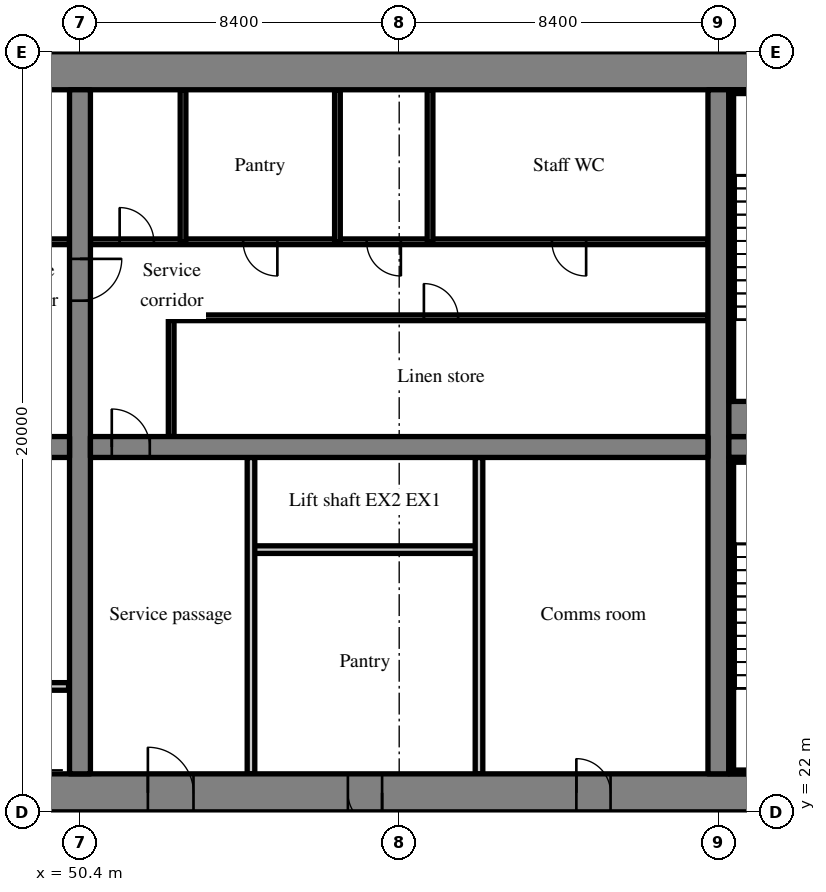
"""IFC4 building model, lengths in metres.
Left out: names, types, materials, properties, quantities, classifications, styles, units other than length and angle.
Written with IfcOpenShell. Run it as: python <this file> out.ifc"""

import sys

from ifc_helpers import new_model, si_unit, direction, frame, frame_2d, origin, place, context, subcontext, project, spatial, rectangle, extrude, source, transform, mapped, element, fill, save


model = new_model("IFC4")
c1 = context("Model", 3, precision=1e-05, world=origin(), true_north=direction((0.0, 1.0)))
c2 = subcontext(c1, "Body", "Model", "MODEL_VIEW")
j1 = project(units=[si_unit("LENGTHUNIT", "METRE"), si_unit("PLANEANGLEUNIT", "RADIAN")], contexts=[c1])
p1 = place(None, origin())
s1 = spatial("IfcSite", under=j1, at=p1, CompositionType="ELEMENT")
p2 = place(p1, origin())
s2 = spatial("IfcBuilding", under=s1, at=p2, CompositionType="ELEMENT")
p3 = place(p2, frame((0.0, 0.0, 77.2)))
s3 = spatial("IfcBuildingStorey", under=s2, at=p3, CompositionType="ELEMENT", Elevation=77.2)
m1 = source(origin(), c2, "Body", "SweptSolid", [
    extrude(rectangle(XDim=50.4, YDim=1.0, at=frame_2d((25.2, 0.0))), origin(), (0.0, 0.0, 1.0), 3.52),
])
p4 = place(p3, frame((25.2, 22.5, 0.0), z_axis=(0.0, 0.0, 1.0), x_axis=(1.0, 0.0, 0.0)))
e1 = element("IfcWall", 1, at=p4, inside=s3, PredefinedType="SHEAR", context=c2, shape_type="MappedRepresentation", body=[
    mapped(m1, transform((0.0, 0.0, 0.0), scale=1.0)),
])
m2 = source(origin(), c2, "Body", "SweptSolid", [
    extrude(rectangle(XDim=1.8, YDim=2.1, at=frame_2d((0.9, 1.05))), frame((0.0, 0.51, 0.0), z_axis=(0.0, -1.0, 0.0), x_axis=(1.0, 0.0, 0.0)), (0.0, 0.0, 1.0), 1.02),
])
p5 = place(p4, frame((15.9, 0.0, 0.0)))
e2 = element("IfcOpeningElement", 2, at=p5, cuts=e1, PredefinedType="OPENING", context=c2, shape_type="MappedRepresentation", body=[
    mapped(m2, transform((0.0, 0.0, 0.0), scale=1.0)),
])
m3 = source(origin(), c2, "Body", "SweptSolid", [
    extrude(rectangle(XDim=1.2, YDim=2.1, at=frame_2d((0.6, 1.05))), frame((0.0, 0.51, 0.0), z_axis=(0.0, -1.0, 0.0), x_axis=(1.0, 0.0, 0.0)), (0.0, 0.0, 1.0), 1.02),
])
p6 = place(p4, frame((26.987, 0.0, 0.0)))
e3 = element("IfcOpeningElement", 3, at=p6, cuts=e1, PredefinedType="OPENING", context=c2, shape_type="MappedRepresentation", body=[
    mapped(m3, transform((0.0, 0.0, 0.0), scale=1.0)),
])
m4 = source(origin(), c2, "Body", "SweptSolid", [
    extrude(rectangle(XDim=0.9, YDim=2.1, at=frame_2d((0.45, 1.05))), frame((0.0, 0.51, 0.0), z_axis=(0.0, -1.0, 0.0), x_axis=(1.0, 0.0, 0.0)), (0.0, 0.0, 1.0), 1.02),
])
p7 = place(p4, frame((32.25, 0.0, 0.0)))
e4 = element("IfcOpeningElement", 4, at=p7, cuts=e1, PredefinedType="OPENING", context=c2, shape_type="MappedRepresentation", body=[
    mapped(m4, transform((0.0, 0.0, 0.0), scale=1.0)),
])
p8 = place(p4, frame((38.262, 0.0, 0.0)))
e5 = element("IfcOpeningElement", 5, at=p8, cuts=e1, PredefinedType="OPENING", context=c2, shape_type="MappedRepresentation", body=[
    mapped(m4, transform((0.0, 0.0, 0.0), scale=1.0)),
])
p9 = place(p4, frame((6.438, 0.0, 0.0)))
e6 = element("IfcOpeningElement", 6, at=p9, cuts=e1, PredefinedType="OPENING", context=c2, shape_type="MappedRepresentation", body=[
    mapped(m3, transform((0.0, 0.0, 0.0), scale=1.0)),
])
p10 = place(p4, frame((47.725, 0.0, 0.0)))
e7 = element("IfcOpeningElement", 7, at=p10, cuts=e1, PredefinedType="OPENING", context=c2, shape_type="MappedRepresentation", body=[
    mapped(m3, transform((0.0, 0.0, 0.0), scale=1.0)),
])
p11 = place(p3, frame((25.2, 41.5, 0.0), z_axis=(0.0, 0.0, 1.0), x_axis=(1.0, 0.0, 0.0)))
e8 = element("IfcWall", 8, at=p11, inside=s3, PredefinedType="SHEAR", context=c2, shape_type="MappedRepresentation", body=[
    mapped(m1, transform((0.0, 0.0, 0.0), scale=1.0)),
])
m5 = source(origin(), c2, "Body", "SweptSolid", [
    extrude(rectangle(XDim=18.0, YDim=0.55, at=frame_2d((9.0, 0.0))), origin(), (0.0, 0.0, 1.0), 3.52),
])
p12 = place(p3, frame((50.4, 23.0, 0.0), z_axis=(0.0, 0.0, 1.0), x_axis=(0.0, 1.0, 0.0)))
e9 = element("IfcWall", 9, at=p12, inside=s3, PredefinedType="SHEAR", context=c2, shape_type="MappedRepresentation", body=[
    mapped(m5, transform((0.0, 0.0, 0.0), scale=1.0)),
])
m6 = source(origin(), c2, "Body", "SweptSolid", [
    extrude(rectangle(XDim=1.1, YDim=2.1, at=frame_2d((0.55, 1.05))), frame((0.0, 0.285, 0.0), z_axis=(0.0, -1.0, 0.0), x_axis=(1.0, 0.0, 0.0)), (0.0, 0.0, 1.0), 0.57),
])
p13 = place(p12, frame((12.45, 0.0, 0.0)))
e10 = element("IfcOpeningElement", 10, at=p13, cuts=e9, PredefinedType="OPENING", context=c2, shape_type="MappedRepresentation", body=[
    mapped(m6, transform((0.0, 0.0, 0.0), scale=1.0)),
])
p14 = place(p3, frame((67.2, 23.0, 0.0), z_axis=(0.0, 0.0, 1.0), x_axis=(0.0, 1.0, 0.0)))
e11 = element("IfcWall", 11, at=p14, inside=s3, PredefinedType="SHEAR", context=c2, shape_type="MappedRepresentation", body=[
    mapped(m5, transform((0.0, 0.0, 0.0), scale=1.0)),
])
m7 = source(origin(), c2, "Body", "SweptSolid", [
    extrude(rectangle(XDim=16.25, YDim=0.55, at=frame_2d((8.125, 0.0))), origin(), (0.0, 0.0, 1.0), 3.52),
])
p15 = place(p3, frame((33.875, 31.6, 0.0), z_axis=(0.0, 0.0, 1.0), x_axis=(1.0, 0.0, 0.0)))
e12 = element("IfcWall", 12, at=p15, inside=s3, PredefinedType="SHEAR", context=c2, shape_type="MappedRepresentation", body=[
    mapped(m7, transform((0.0, 0.0, 0.0), scale=1.0)),
])
m8 = source(origin(), c2, "Body", "SweptSolid", [
    extrude(rectangle(XDim=1.0, YDim=2.1, at=frame_2d((0.5, 1.05))), frame((0.0, 0.285, 0.0), z_axis=(0.0, -1.0, 0.0), x_axis=(1.0, 0.0, 0.0)), (0.0, 0.0, 1.0), 0.57),
])
p16 = place(p15, frame((14.687, 0.0, 0.0)))
e13 = element("IfcOpeningElement", 13, at=p16, cuts=e12, PredefinedType="OPENING", context=c2, shape_type="MappedRepresentation", body=[
    mapped(m8, transform((0.0, 0.0, 0.0), scale=1.0)),
])
p17 = place(p3, frame((50.675, 31.6, 0.0), z_axis=(0.0, 0.0, 1.0), x_axis=(1.0, 0.0, 0.0)))
e14 = element("IfcWall", 14, at=p17, inside=s3, PredefinedType="SHEAR", context=c2, shape_type="MappedRepresentation", body=[
    mapped(m7, transform((0.0, 0.0, 0.0), scale=1.0)),
])
p18 = place(p17, frame((0.562, 0.0, 0.0)))
e15 = element("IfcOpeningElement", 15, at=p18, cuts=e14, PredefinedType="OPENING", context=c2, shape_type="MappedRepresentation", body=[
    mapped(m8, transform((0.0, 0.0, 0.0), scale=1.0)),
])
m9 = source(origin(), c2, "Body", "SweptSolid", [
    extrude(rectangle(XDim=7.125, YDim=0.55, at=frame_2d((3.562, 0.0))), origin(), (0.0, 0.0, 1.0), 3.52),
])
p19 = place(p3, frame((67.475, 31.6, 0.0), z_axis=(0.0, 0.0, 1.0), x_axis=(1.0, 0.0, 0.0)))
e16 = element("IfcWall", 16, at=p19, inside=s3, PredefinedType="SHEAR", context=c2, shape_type="MappedRepresentation", body=[
    mapped(m9, transform((0.0, 0.0, 0.0), scale=1.0)),
])
p20 = place(p19, frame((5.5, 0.0, 0.0)))
e17 = element("IfcOpeningElement", 17, at=p20, cuts=e16, PredefinedType="OPENING", context=c2, shape_type="MappedRepresentation", body=[
    mapped(m6, transform((0.0, 0.0, 0.0), scale=1.0)),
])
m10 = source(origin(), c2, "Body", "SweptSolid", [
    extrude(rectangle(XDim=6.0, YDim=0.2, at=frame_2d((3.0, 0.0))), origin(), (0.0, 0.0, 1.0), 3.52),
])
p21 = place(p3, frame((44.1, 25.3, 0.0), z_axis=(0.0, 0.0, 1.0), x_axis=(1.0, 0.0, 0.0)))
e18 = element("IfcWall", 18, at=p21, inside=s3, PredefinedType="SOLIDWALL", context=c2, shape_type="MappedRepresentation", body=[
    mapped(m10, transform((0.0, 0.0, 0.0), scale=1.0)),
])
m11 = source(origin(), c2, "Body", "SweptSolid", [
    extrude(rectangle(XDim=1.1, YDim=2.1, at=frame_2d((0.55, 1.05))), frame((0.0, 0.11, 0.0), z_axis=(0.0, -1.0, 0.0), x_axis=(1.0, 0.0, 0.0)), (0.0, 0.0, 1.0), 0.22),
])
p22 = place(p21, frame((0.95, 0.0, 0.0)))
e19 = element("IfcOpeningElement", 19, at=p22, cuts=e18, PredefinedType="OPENING", context=c2, shape_type="MappedRepresentation", body=[
    mapped(m11, transform((0.0, 0.0, 0.0), scale=1.0)),
])
p23 = place(p21, frame((3.95, 0.0, 0.0)))
e20 = element("IfcOpeningElement", 20, at=p23, cuts=e18, PredefinedType="OPENING", context=c2, shape_type="MappedRepresentation", body=[
    mapped(m11, transform((0.0, 0.0, 0.0), scale=1.0)),
])
m12 = source(origin(), c2, "Body", "SweptSolid", [
    extrude(rectangle(XDim=16.25, YDim=0.15, at=frame_2d((8.125, 0.0))), origin(), (0.0, 0.0, 1.0), 3.52),
])
p24 = place(p3, frame((33.875, 37.0, 0.0), z_axis=(0.0, 0.0, 1.0), x_axis=(1.0, 0.0, 0.0)))
e21 = element("IfcWall", 21, at=p24, inside=s3, PredefinedType="PARTITIONING", context=c2, shape_type="MappedRepresentation", body=[
    mapped(m12, transform((0.0, 0.0, 0.0), scale=1.0)),
])
m13 = source(origin(), c2, "Body", "SweptSolid", [
    extrude(rectangle(XDim=0.9, YDim=2.1, at=frame_2d((0.45, 1.05))), frame((0.0, 0.085, 0.0), z_axis=(0.0, -1.0, 0.0), x_axis=(1.0, 0.0, 0.0)), (0.0, 0.0, 1.0), 0.17),
])
p25 = place(p24, frame((1.581, 0.0, 0.0)))
e22 = element("IfcOpeningElement", 22, at=p25, cuts=e21, PredefinedType="OPENING", context=c2, shape_type="MappedRepresentation", body=[
    mapped(m13, transform((0.0, 0.0, 0.0), scale=1.0)),
])
p26 = place(p24, frame((7.269, 0.0, 0.0)))
e23 = element("IfcOpeningElement", 23, at=p26, cuts=e21, PredefinedType="OPENING", context=c2, shape_type="MappedRepresentation", body=[
    mapped(m13, transform((0.0, 0.0, 0.0), scale=1.0)),
])
p27 = place(p24, frame((12.144, 0.0, 0.0)))
e24 = element("IfcOpeningElement", 24, at=p27, cuts=e21, PredefinedType="OPENING", context=c2, shape_type="MappedRepresentation", body=[
    mapped(m13, transform((0.0, 0.0, 0.0), scale=1.0)),
])
p28 = place(p24, frame((14.581, 0.0, 0.0)))
e25 = element("IfcOpeningElement", 25, at=p28, cuts=e21, PredefinedType="OPENING", context=c2, shape_type="MappedRepresentation", body=[
    mapped(m13, transform((0.0, 0.0, 0.0), scale=1.0)),
])
p29 = place(p3, frame((60.9, 28.9, 0.0), z_axis=(0.0, 0.0, 1.0), x_axis=(-1.0, 0.0, 0.0)))
e26 = element("IfcWall", 26, at=p29, inside=s3, PredefinedType="SOLIDWALL", context=c2, shape_type="MappedRepresentation", body=[
    mapped(m10, transform((0.0, 0.0, 0.0), scale=1.0)),
])
m14 = source(origin(), c2, "Body", "SweptSolid", [
    extrude(rectangle(XDim=8.325, YDim=0.2, at=frame_2d((4.163, 0.0))), origin(), (0.0, 0.0, 1.0), 3.52),
])
for number, where, z_axis, x_axis in (
    (27, (54.9, 23.0, 0.0), (0.0, 0.0, 1.0), (0.0, 1.0, 0.0)),
    (28, (60.9, 23.0, 0.0), (0.0, 0.0, 1.0), (0.0, 1.0, 0.0)),
):
    element("IfcWall", number, at=place(p3, frame(where, z_axis=z_axis, x_axis=x_axis)), inside=s3, PredefinedType="PARTITIONING", context=c2, shape_type="MappedRepresentation", body=[
        mapped(m14, transform((0.0, 0.0, 0.0), scale=1.0)),
    ])
m15 = source(origin(), c2, "Body", "SweptSolid", [
    extrude(rectangle(XDim=3.125, YDim=0.15, at=frame_2d((1.562, 0.0))), origin(), (0.0, 0.0, 1.0), 3.52),
])
p30 = place(p3, frame((52.8, 31.875, 0.0), z_axis=(0.0, 0.0, 1.0), x_axis=(0.0, 1.0, 0.0)))
e29 = element("IfcWall", 29, at=p30, inside=s3, PredefinedType="PARTITIONING", context=c2, shape_type="MappedRepresentation", body=[
    mapped(m15, transform((0.0, 0.0, 0.0), scale=1.0)),
])
m16 = source(origin(), c2, "Body", "SweptSolid", [
    extrude(rectangle(XDim=14.125, YDim=0.15, at=frame_2d((7.062, 0.0))), origin(), (0.0, 0.0, 1.0), 3.52),
])
p31 = place(p3, frame((66.925, 35.0, 0.0), z_axis=(0.0, 0.0, 1.0), x_axis=(-1.0, 0.0, 0.0)))
e30 = element("IfcWall", 30, at=p31, inside=s3, PredefinedType="PARTITIONING", context=c2, shape_type="MappedRepresentation", body=[
    mapped(m16, transform((0.0, 0.0, 0.0), scale=1.0)),
])
p32 = place(p31, frame((6.575, 0.0, 0.0)))
e31 = element("IfcOpeningElement", 31, at=p32, cuts=e30, PredefinedType="OPENING", context=c2, shape_type="MappedRepresentation", body=[
    mapped(m13, transform((0.0, 0.0, 0.0), scale=1.0)),
])
p33 = place(p3, frame((66.925, 37.0, 0.0), z_axis=(0.0, 0.0, 1.0), x_axis=(-1.0, 0.0, 0.0)))
e32 = element("IfcWall", 32, at=p33, inside=s3, PredefinedType="PARTITIONING", context=c2, shape_type="MappedRepresentation", body=[
    mapped(m12, transform((0.0, 0.0, 0.0), scale=1.0)),
])
p34 = place(p33, frame((3.206, 0.0, 0.0)))
e33 = element("IfcOpeningElement", 33, at=p34, cuts=e32, PredefinedType="OPENING", context=c2, shape_type="MappedRepresentation", body=[
    mapped(m13, transform((0.0, 0.0, 0.0), scale=1.0)),
])
p35 = place(p33, frame((8.081, 0.0, 0.0)))
e34 = element("IfcOpeningElement", 34, at=p35, cuts=e32, PredefinedType="OPENING", context=c2, shape_type="MappedRepresentation", body=[
    mapped(m13, transform((0.0, 0.0, 0.0), scale=1.0)),
])
p36 = place(p33, frame((11.331, 0.0, 0.0)))
e35 = element("IfcOpeningElement", 35, at=p36, cuts=e32, PredefinedType="OPENING", context=c2, shape_type="MappedRepresentation", body=[
    mapped(m13, transform((0.0, 0.0, 0.0), scale=1.0)),
])
p37 = place(p33, frame((14.581, 0.0, 0.0)))
e36 = element("IfcOpeningElement", 36, at=p37, cuts=e32, PredefinedType="OPENING", context=c2, shape_type="MappedRepresentation", body=[
    mapped(m13, transform((0.0, 0.0, 0.0), scale=1.0)),
])
m17 = source(origin(), c2, "Body", "SweptSolid", [
    extrude(rectangle(XDim=4.0, YDim=0.15, at=frame_2d((2.0, 0.0))), origin(), (0.0, 0.0, 1.0), 3.52),
])
for number, where, z_axis, x_axis in (
    (37, (59.612, 37.0, 0.0), (0.0, 0.0, 1.0), (0.0, 1.0, 0.0)),
    (38, (57.175, 37.0, 0.0), (0.0, 0.0, 1.0), (0.0, 1.0, 0.0)),
    (39, (53.112, 37.0, 0.0), (0.0, 0.0, 1.0), (0.0, 1.0, 0.0)),
):
    element("IfcWall", number, at=place(p3, frame(where, z_axis=z_axis, x_axis=x_axis)), inside=s3, PredefinedType="PARTITIONING", context=c2, shape_type="MappedRepresentation", body=[
        mapped(m17, transform((0.0, 0.0, 0.0), scale=1.0)),
    ])
m18 = source(origin(), c2, "Body", "SweptSolid", [
    extrude(rectangle(XDim=4.775, YDim=0.1, at=frame_2d((2.387, 0.0))), origin(), (0.0, 0.0, 1.0), 3.52),
])
p38 = place(p3, frame((67.475, 23.05, 0.0), z_axis=(0.0, 0.0, 1.0), x_axis=(1.0, 0.0, 0.0)))
e40 = element("IfcWall", 40, at=p38, inside=s3, PredefinedType="SOLIDWALL", context=c2, shape_type="MappedRepresentation", body=[
    mapped(m18, transform((0.0, 0.0, 0.0), scale=1.0)),
])
m19 = source(origin(), c2, "Body", "SweptSolid", [
    extrude(rectangle(XDim=4.775, YDim=0.125, at=frame_2d((2.387, 0.0))), origin(), (0.0, 0.0, 1.0), 3.52),
])
p39 = place(p3, frame((67.475, 31.262, 0.0), z_axis=(0.0, 0.0, 1.0), x_axis=(1.0, 0.0, 0.0)))
e41 = element("IfcWall", 41, at=p39, inside=s3, PredefinedType="SOLIDWALL", context=c2, shape_type="MappedRepresentation", body=[
    mapped(m19, transform((0.0, 0.0, 0.0), scale=1.0)),
])
m20 = source(origin(), c2, "Body", "SweptSolid", [
    extrude(rectangle(XDim=8.1, YDim=0.125, at=frame_2d((4.05, 0.0))), origin(), (0.0, 0.0, 1.0), 3.52),
])
p40 = place(p3, frame((67.537, 23.1, 0.0), z_axis=(0.0, 0.0, 1.0), x_axis=(0.0, 1.0, 0.0)))
e42 = element("IfcWall", 42, at=p40, inside=s3, PredefinedType="SOLIDWALL", context=c2, shape_type="MappedRepresentation", body=[
    mapped(m20, transform((0.0, 0.0, 0.0), scale=1.0)),
])
p41 = place(p3, frame((67.475, 40.95, 0.0), z_axis=(0.0, 0.0, 1.0), x_axis=(1.0, 0.0, 0.0)))
e43 = element("IfcWall", 43, at=p41, inside=s3, PredefinedType="SOLIDWALL", context=c2, shape_type="MappedRepresentation", body=[
    mapped(m18, transform((0.0, 0.0, 0.0), scale=1.0)),
])
m21 = source(origin(), c2, "Body", "SweptSolid", [
    extrude(rectangle(XDim=4.775, YDim=0.925, at=frame_2d((2.387, 0.0))), origin(), (0.0, 0.0, 1.0), 3.52),
])
p42 = place(p3, frame((67.475, 32.337, 0.0), z_axis=(0.0, 0.0, 1.0), x_axis=(1.0, 0.0, 0.0)))
e44 = element("IfcWall", 44, at=p42, inside=s3, PredefinedType="SOLIDWALL", context=c2, shape_type="MappedRepresentation", body=[
    mapped(m21, transform((0.0, 0.0, 0.0), scale=1.0)),
])
p43 = place(p3, frame((67.537, 32.8, 0.0), z_axis=(0.0, 0.0, 1.0), x_axis=(0.0, 1.0, 0.0)))
e45 = element("IfcWall", 45, at=p43, inside=s3, PredefinedType="SOLIDWALL", context=c2, shape_type="MappedRepresentation", body=[
    mapped(m20, transform((0.0, 0.0, 0.0), scale=1.0)),
])
m22 = source(origin(), c2, "Body", "SweptSolid", [
    extrude(rectangle(XDim=1.2, YDim=2.1, at=frame_2d((0.6, 1.05))), frame((0.0, 0.375, 0.0), z_axis=(0.0, -1.0, 0.0), x_axis=(1.0, 0.0, 0.0)), (0.0, 0.0, 1.0), 0.05),
])
p44 = place(p6, origin())
e46 = element("IfcDoor", 46, at=p44, inside=s3, OperationType="SINGLE_SWING_LEFT", PredefinedType="DOOR", context=c2, shape_type="MappedRepresentation", body=[
    mapped(m22, transform((0.0, 0.0, 0.0), scale=1.0)),
])
fill(e3, e46)
m23 = source(origin(), c2, "Body", "SweptSolid", [
    extrude(rectangle(XDim=1.0, YDim=2.1, at=frame_2d((0.5, 1.05))), frame((0.0, 0.025, 0.0), z_axis=(0.0, -1.0, 0.0), x_axis=(1.0, 0.0, 0.0)), (0.0, 0.0, 1.0), 0.05),
])
p45 = place(p18, origin())
e47 = element("IfcDoor", 47, at=p45, inside=s3, OperationType="SINGLE_SWING_LEFT", PredefinedType="DOOR", context=c2, shape_type="MappedRepresentation", body=[
    mapped(m23, transform((0.0, 0.0, 0.0), scale=1.0)),
])
fill(e15, e47)
m24 = source(origin(), c2, "Body", "SweptSolid", [
    extrude(rectangle(XDim=0.9, YDim=2.1, at=frame_2d((0.45, 1.05))), frame((0.0, 0.375, 0.0), z_axis=(0.0, -1.0, 0.0), x_axis=(1.0, 0.0, 0.0)), (0.0, 0.0, 1.0), 0.05),
])
p46 = place(p7, origin())
e48 = element("IfcDoor", 48, at=p46, inside=s3, OperationType="SINGLE_SWING_RIGHT", PredefinedType="DOOR", context=c2, shape_type="MappedRepresentation", body=[
    mapped(m24, transform((0.0, 0.0, 0.0), scale=1.0)),
])
fill(e4, e48)
p47 = place(p8, origin())
e49 = element("IfcDoor", 49, at=p47, inside=s3, OperationType="SINGLE_SWING_LEFT", PredefinedType="DOOR", context=c2, shape_type="MappedRepresentation", body=[
    mapped(m24, transform((0.0, 0.0, 0.0), scale=1.0)),
])
fill(e5, e49)
m25 = source(origin(), c2, "Body", "SweptSolid", [
    extrude(rectangle(XDim=0.9, YDim=2.1, at=frame_2d((0.45, 1.05))), frame((0.0, 0.025, 0.0), z_axis=(0.0, -1.0, 0.0), x_axis=(1.0, 0.0, 0.0)), (0.0, 0.0, 1.0), 0.05),
])
p48 = place(p32, origin())
e50 = element("IfcDoor", 50, at=p48, inside=s3, OperationType="SINGLE_SWING_RIGHT", PredefinedType="DOOR", context=c2, shape_type="MappedRepresentation", body=[
    mapped(m25, transform((0.0, 0.0, 0.0), scale=1.0)),
])
fill(e31, e50)
p49 = place(p34, origin())
e51 = element("IfcDoor", 51, at=p49, inside=s3, OperationType="SINGLE_SWING_LEFT", PredefinedType="DOOR", context=c2, shape_type="MappedRepresentation", body=[
    mapped(m25, transform((0.0, 0.0, 0.0), scale=1.0)),
])
fill(e33, e51)
p50 = place(p35, origin())
e52 = element("IfcDoor", 52, at=p50, inside=s3, OperationType="SINGLE_SWING_LEFT", PredefinedType="DOOR", context=c2, shape_type="MappedRepresentation", body=[
    mapped(m25, transform((0.0, 0.0, 0.0), scale=1.0)),
])
fill(e34, e52)
p51 = place(p36, origin())
e53 = element("IfcDoor", 53, at=p51, inside=s3, OperationType="SINGLE_SWING_LEFT", PredefinedType="DOOR", context=c2, shape_type="MappedRepresentation", body=[
    mapped(m25, transform((0.0, 0.0, 0.0), scale=1.0)),
])
fill(e35, e53)
p52 = place(p37, origin())
e54 = element("IfcDoor", 54, at=p52, inside=s3, OperationType="SINGLE_SWING_RIGHT", PredefinedType="DOOR", context=c2, shape_type="MappedRepresentation", body=[
    mapped(m25, transform((0.0, 0.0, 0.0), scale=1.0)),
])
fill(e36, e54)
m26 = source(origin(), c2, "Body", "SweptSolid", [
    extrude(rectangle(XDim=1.1, YDim=2.1, at=frame_2d((0.55, 1.05))), frame((0.0, 0.025, 0.0), z_axis=(0.0, -1.0, 0.0), x_axis=(1.0, 0.0, 0.0)), (0.0, 0.0, 1.0), 0.05),
])
p53 = place(p13, origin())
e55 = element("IfcDoor", 55, at=p53, inside=s3, OperationType="SINGLE_SWING_RIGHT", PredefinedType="DOOR", context=c2, shape_type="MappedRepresentation", body=[
    mapped(m26, transform((0.0, 0.0, 0.0), scale=1.0)),
])
fill(e10, e55)
save(model, sys.argv[1])
